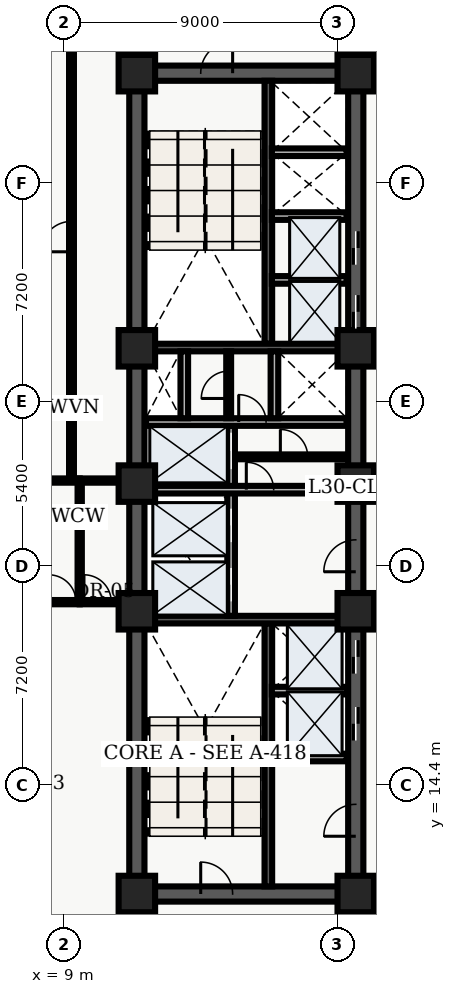
"""IFC4 building model, lengths in metres.
Left out: names, types, materials, properties, quantities, classifications, styles, units other than length and angle.
Written with IfcOpenShell. Run it as: python <this file> out.ifc"""

import sys

from ifc_helpers import new_model, entity, si_unit, converted_unit, direction, frame, origin_with_axes, origin_2d_with_axis, place, context, subcontext, project, spatial, polyline, rectangle, outline, extrude, element, fill, save


model = new_model("IFC4")
c1 = context("Model", 3, precision=1e-05, world=origin_with_axes(), true_north=direction((0.0, 1.0)))
c2 = subcontext(c1, "Body", "Model", "MODEL_VIEW")
j1 = project(units=[si_unit("LENGTHUNIT", "METRE"), converted_unit("PLANEANGLEUNIT", "DEGREE", entity("IfcPlaneAngleMeasure", 0.017), si_unit("PLANEANGLEUNIT", "RADIAN"), dimensions=[0, 0, 0, 0, 0, 0, 0])], contexts=[c1])
p1 = place(None, origin_with_axes())
s1 = spatial("IfcSite", under=j1, at=p1, CompositionType="ELEMENT")
p2 = place(p1, origin_with_axes())
s2 = spatial("IfcBuilding", under=s1, at=p2, CompositionType="ELEMENT")
p3 = place(p2, frame((0.0, 0.0, 124.2), z_axis=(0.0, 0.0, 1.0), x_axis=(1.0, 0.0, 0.0)))
s3 = spatial("IfcBuildingStorey", under=s2, at=p3, CompositionType="ELEMENT", Elevation=124.2)
p4 = place(p3, frame((11.4, 10.8, 0.0), z_axis=(0.0, 0.0, 1.0), x_axis=(0.0, 1.0, 0.0)))
e1 = element("IfcWall", 1, at=p4, inside=s3, PredefinedType="SHEAR", context=c2, shape_type="SweptSolid", body=[
    extrude(outline(polyline([(0.0, -0.25), (27.0, -0.25), (27.0, 0.25), (0.0, 0.25), (0.0, -0.25)])), origin_with_axes(), (0.0, 0.0, 1.0), 4.56),
])
p5 = place(p3, frame((11.4, 10.8, 0.0), z_axis=(0.0, 0.0, 1.0), x_axis=(1.0, 0.0, 0.0)))
e2 = element("IfcWall", 2, at=p5, inside=s3, PredefinedType="SHEAR", context=c2, shape_type="SweptSolid", body=[
    extrude(outline(polyline([(0.0, -0.25), (7.2, -0.25), (7.2, 0.25), (0.0, 0.25), (0.0, -0.25)])), origin_with_axes(), (0.0, 0.0, 1.0), 4.56),
])
p6 = place(p5, frame((2.625, 0.0, 0.0), z_axis=(0.0, 0.0, 1.0), x_axis=(1.0, 0.0, 0.0)))
e3 = element("IfcOpeningElement", 3, at=p6, cuts=e2, PredefinedType="OPENING", context=c2, shape_type="SweptSolid", body=[
    extrude(rectangle(XDim=1.05, YDim=0.52, at=origin_2d_with_axis()), origin_with_axes(), (0.0, 0.0, 1.0), 2.15),
])
p7 = place(p3, frame((11.4, 37.8, 0.0), z_axis=(0.0, 0.0, 1.0), x_axis=(1.0, 0.0, 0.0)))
e4 = element("IfcWall", 4, at=p7, inside=s3, PredefinedType="SHEAR", context=c2, shape_type="SweptSolid", body=[
    extrude(outline(polyline([(0.0, -0.25), (7.2, -0.25), (7.2, 0.25), (0.0, 0.25), (0.0, -0.25)])), origin_with_axes(), (0.0, 0.0, 1.0), 4.56),
])
p8 = place(p7, frame((2.625, 0.0, 0.0), z_axis=(0.0, 0.0, 1.0), x_axis=(1.0, 0.0, 0.0)))
e5 = element("IfcOpeningElement", 5, at=p8, cuts=e4, PredefinedType="OPENING", context=c2, shape_type="SweptSolid", body=[
    extrude(rectangle(XDim=1.05, YDim=0.52, at=origin_2d_with_axis()), origin_with_axes(), (0.0, 0.0, 1.0), 2.15),
])
p9 = place(p3, frame((18.6, 10.8, 0.0), z_axis=(0.0, 0.0, 1.0), x_axis=(0.0, 1.0, 0.0)))
e6 = element("IfcWall", 6, at=p9, inside=s3, PredefinedType="SHEAR", context=c2, shape_type="SweptSolid", body=[
    extrude(outline(polyline([(0.0, -0.25), (13.5, -0.25), (13.5, 0.25), (0.0, 0.25), (0.0, -0.25)])), origin_with_axes(), (0.0, 0.0, 1.0), 4.56),
])
p10 = place(p9, frame((5.6, 0.0, 0.0), z_axis=(0.0, 0.0, 1.0), x_axis=(1.0, 0.0, 0.0)))
e7 = element("IfcOpeningElement", 7, at=p10, cuts=e6, PredefinedType="OPENING", context=c2, shape_type="SweptSolid", body=[
    extrude(rectangle(XDim=1.1, YDim=0.52, at=origin_2d_with_axis()), origin_with_axes(), (0.0, 0.0, 1.0), 2.15),
])
p11 = place(p9, frame((7.8, 0.0, 0.0), z_axis=(0.0, 0.0, 1.0), x_axis=(1.0, 0.0, 0.0)))
e8 = element("IfcOpeningElement", 8, at=p11, cuts=e6, PredefinedType="OPENING", context=c2, shape_type="SweptSolid", body=[
    extrude(rectangle(XDim=1.1, YDim=0.52, at=origin_2d_with_axis()), origin_with_axes(), (0.0, 0.0, 1.0), 2.15),
])
p12 = place(p9, frame((11.125, 0.0, 0.0), z_axis=(0.0, 0.0, 1.0), x_axis=(1.0, 0.0, 0.0)))
e9 = element("IfcOpeningElement", 9, at=p12, cuts=e6, PredefinedType="OPENING", context=c2, shape_type="SweptSolid", body=[
    extrude(rectangle(XDim=1.05, YDim=0.52, at=origin_2d_with_axis()), origin_with_axes(), (0.0, 0.0, 1.0), 2.15),
])
p13 = place(p9, frame((2.425, 0.0, 0.0), z_axis=(0.0, 0.0, 1.0), x_axis=(1.0, 0.0, 0.0)))
e10 = element("IfcOpeningElement", 10, at=p13, cuts=e6, PredefinedType="OPENING", context=c2, shape_type="SweptSolid", body=[
    extrude(rectangle(XDim=1.05, YDim=0.52, at=origin_2d_with_axis()), origin_with_axes(), (0.0, 0.0, 1.0), 2.15),
])
p14 = place(p3, frame((18.6, 24.3, 0.0), z_axis=(0.0, 0.0, 1.0), x_axis=(0.0, 1.0, 0.0)))
e11 = element("IfcWall", 11, at=p14, inside=s3, PredefinedType="SHEAR", context=c2, shape_type="SweptSolid", body=[
    extrude(outline(polyline([(0.0, -0.25), (13.5, -0.25), (13.5, 0.25), (0.0, 0.25), (0.0, -0.25)])), origin_with_axes(), (0.0, 0.0, 1.0), 4.56),
])
p15 = place(p14, frame((5.65, 0.0, 0.0), z_axis=(0.0, 0.0, 1.0), x_axis=(1.0, 0.0, 0.0)))
e12 = element("IfcOpeningElement", 12, at=p15, cuts=e11, PredefinedType="OPENING", context=c2, shape_type="SweptSolid", body=[
    extrude(rectangle(XDim=1.1, YDim=0.52, at=origin_2d_with_axis()), origin_with_axes(), (0.0, 0.0, 1.0), 2.15),
])
p16 = place(p14, frame((7.75, 0.0, 0.0), z_axis=(0.0, 0.0, 1.0), x_axis=(1.0, 0.0, 0.0)))
e13 = element("IfcOpeningElement", 13, at=p16, cuts=e11, PredefinedType="OPENING", context=c2, shape_type="SweptSolid", body=[
    extrude(rectangle(XDim=1.1, YDim=0.52, at=origin_2d_with_axis()), origin_with_axes(), (0.0, 0.0, 1.0), 2.15),
])
p17 = place(p3, frame((15.725, 11.05, 0.0), z_axis=(0.0, 0.0, 1.0), x_axis=(0.0, 1.0, 0.0)))
e14 = element("IfcWall", 14, at=p17, inside=s3, PredefinedType="SHEAR", context=c2, shape_type="SweptSolid", body=[
    extrude(outline(polyline([(0.0, -0.125), (8.65, -0.125), (8.65, 0.125), (0.0, 0.125), (0.0, -0.125)])), origin_with_axes(), (0.0, 0.0, 1.0), 4.56),
])
p18 = place(p3, frame((11.65, 19.825, 0.0), z_axis=(0.0, 0.0, 1.0), x_axis=(1.0, 0.0, 0.0)))
e15 = element("IfcWall", 15, at=p18, inside=s3, PredefinedType="SHEAR", context=c2, shape_type="SweptSolid", body=[
    extrude(outline(polyline([(0.0, -0.125), (6.7, -0.125), (6.7, 0.125), (0.0, 0.125), (0.0, -0.125)])), origin_with_axes(), (0.0, 0.0, 1.0), 4.56),
])
p19 = place(p3, frame((15.725, 28.9, 0.0), z_axis=(0.0, 0.0, 1.0), x_axis=(0.0, 1.0, 0.0)))
e16 = element("IfcWall", 16, at=p19, inside=s3, PredefinedType="SHEAR", context=c2, shape_type="SweptSolid", body=[
    extrude(outline(polyline([(0.0, -0.125), (8.65, -0.125), (8.65, 0.125), (0.0, 0.125), (0.0, -0.125)])), origin_with_axes(), (0.0, 0.0, 1.0), 4.56),
])
p20 = place(p3, frame((11.65, 28.775, 0.0), z_axis=(0.0, 0.0, 1.0), x_axis=(1.0, 0.0, 0.0)))
e17 = element("IfcWall", 17, at=p20, inside=s3, PredefinedType="SHEAR", context=c2, shape_type="SweptSolid", body=[
    extrude(outline(polyline([(0.0, -0.125), (6.7, -0.125), (6.7, 0.125), (0.0, 0.125), (0.0, -0.125)])), origin_with_axes(), (0.0, 0.0, 1.0), 4.56),
])
p21 = place(p3, frame((14.5, 19.95, 0.0), z_axis=(0.0, 0.0, 1.0), x_axis=(0.0, 1.0, 0.0)))
e18 = element("IfcWall", 18, at=p21, inside=s3, PredefinedType="SOLIDWALL", context=c2, shape_type="SweptSolid", body=[
    extrude(outline(polyline([(0.0, -0.125), (6.25, -0.125), (6.25, 0.125), (0.0, 0.125), (0.0, -0.125)])), origin_with_axes(), (0.0, 0.0, 1.0), 3.6),
])
p22 = place(p21, frame((1.025, 0.0, 0.0), z_axis=(0.0, 0.0, 1.0), x_axis=(1.0, 0.0, 0.0)))
e19 = element("IfcOpeningElement", 19, at=p22, cuts=e18, PredefinedType="OPENING", context=c2, shape_type="SweptSolid", body=[
    extrude(rectangle(XDim=1.1, YDim=0.27, at=origin_2d_with_axis()), origin_with_axes(), (0.0, 0.0, 1.0), 2.15),
])
p23 = place(p21, frame((2.975, 0.0, 0.0), z_axis=(0.0, 0.0, 1.0), x_axis=(1.0, 0.0, 0.0)))
e20 = element("IfcOpeningElement", 20, at=p23, cuts=e18, PredefinedType="OPENING", context=c2, shape_type="SweptSolid", body=[
    extrude(rectangle(XDim=1.1, YDim=0.27, at=origin_2d_with_axis()), origin_with_axes(), (0.0, 0.0, 1.0), 2.15),
])
p24 = place(p21, frame((5.425, 0.0, 0.0), z_axis=(0.0, 0.0, 1.0), x_axis=(1.0, 0.0, 0.0)))
e21 = element("IfcOpeningElement", 21, at=p24, cuts=e18, PredefinedType="OPENING", context=c2, shape_type="SweptSolid", body=[
    extrude(rectangle(XDim=1.2, YDim=0.27, at=origin_2d_with_axis()), origin_with_axes(), (0.0, 0.0, 1.0), 2.15),
])
p25 = place(p3, frame((11.7, 24.1, 0.0), z_axis=(0.0, 0.0, 1.0), x_axis=(1.0, 0.0, 0.0)))
e22 = element("IfcWall", 22, at=p25, inside=s3, PredefinedType="SOLIDWALL", context=c2, shape_type="SweptSolid", body=[
    extrude(outline(polyline([(0.0, -0.125), (6.6, -0.125), (6.6, 0.125), (0.0, 0.125), (0.0, -0.125)])), origin_with_axes(), (0.0, 0.0, 1.0), 3.6),
])
p26 = place(p25, frame((3.75, 0.0, 0.0), z_axis=(0.0, 0.0, 1.0), x_axis=(1.0, 0.0, 0.0)))
e23 = element("IfcOpeningElement", 23, at=p26, cuts=e22, PredefinedType="OPENING", context=c2, shape_type="SweptSolid", body=[
    extrude(rectangle(XDim=0.9, YDim=0.27, at=origin_2d_with_axis()), origin_with_axes(), (0.0, 0.0, 1.0), 2.15),
])
p27 = place(p3, frame((11.7, 26.325, 0.0), z_axis=(0.0, 0.0, 1.0), x_axis=(1.0, 0.0, 0.0)))
e24 = element("IfcWall", 24, at=p27, inside=s3, PredefinedType="SOLIDWALL", context=c2, shape_type="SweptSolid", body=[
    extrude(outline(polyline([(0.0, -0.125), (6.6, -0.125), (6.6, 0.125), (0.0, 0.125), (0.0, -0.125)])), origin_with_axes(), (0.0, 0.0, 1.0), 3.6),
])
p28 = place(p27, frame((3.5, 0.0, 0.0), z_axis=(0.0, 0.0, 1.0), x_axis=(1.0, 0.0, 0.0)))
e25 = element("IfcOpeningElement", 25, at=p28, cuts=e24, PredefinedType="OPENING", context=c2, shape_type="SweptSolid", body=[
    extrude(rectangle(XDim=0.9, YDim=0.27, at=origin_2d_with_axis()), origin_with_axes(), (0.0, 0.0, 1.0), 2.15),
])
for number, where, z_axis, x_axis in (
    (26, (12.96, 26.45, 0.0), (0.0, 0.0, 1.0), (0.0, 1.0, 0.0)),
    (27, (15.925, 26.45, 0.0), (0.0, 0.0, 1.0), (0.0, 1.0, 0.0)),
):
    element("IfcWall", number, at=place(p3, frame(where, z_axis=z_axis, x_axis=x_axis)), inside=s3, PredefinedType="SOLIDWALL", context=c2, shape_type="SweptSolid", body=[
        extrude(outline(polyline([(0.0, -0.125), (2.2, -0.125), (2.2, 0.125), (0.0, 0.125), (0.0, -0.125)])), origin_with_axes(), (0.0, 0.0, 1.0), 3.6),
    ])
for number, where, z_axis, x_axis in (
    (28, (11.4, 10.8, 0.0), (0.0, 0.0, 1.0), (1.0, 0.0, 0.0)),
    (29, (11.4, 20.1, 0.0), (0.0, 0.0, 1.0), (1.0, 0.0, 0.0)),
    (30, (11.4, 24.3, 0.0), (0.0, 0.0, 1.0), (1.0, 0.0, 0.0)),
    (31, (11.4, 28.75, 0.0), (0.0, 0.0, 1.0), (1.0, 0.0, 0.0)),
    (32, (11.4, 37.8, 0.0), (0.0, 0.0, 1.0), (1.0, 0.0, 0.0)),
    (33, (18.6, 10.8, 0.0), (0.0, 0.0, 1.0), (1.0, 0.0, 0.0)),
    (34, (18.6, 20.1, 0.0), (0.0, 0.0, 1.0), (1.0, 0.0, 0.0)),
    (35, (18.6, 24.3, 0.0), (0.0, 0.0, 1.0), (1.0, 0.0, 0.0)),
    (36, (18.6, 28.75, 0.0), (0.0, 0.0, 1.0), (1.0, 0.0, 0.0)),
    (37, (18.6, 37.8, 0.0), (0.0, 0.0, 1.0), (1.0, 0.0, 0.0)),
):
    element("IfcColumn", number, at=place(p3, frame(where, z_axis=z_axis, x_axis=x_axis)), inside=s3, PredefinedType="COLUMN", context=c2, shape_type="SweptSolid", body=[
        extrude(rectangle(XDim=1.2, YDim=1.2, at=origin_2d_with_axis()), origin_with_axes(), (0.0, 0.0, 1.0), 4.8),
    ])
p29 = place(p3, frame((14.62, 25.18, 0.0), z_axis=(0.0, 0.0, 1.0), x_axis=(1.0, 0.0, 0.0)))
e38 = element("IfcWall", 38, at=p29, inside=s3, PredefinedType="PARTITIONING", context=c2, shape_type="SweptSolid", body=[
    extrude(outline(polyline([(0.0, -0.08), (3.68, -0.08), (3.68, 0.08), (0.0, 0.08), (0.0, -0.08)])), origin_with_axes(), (0.0, 0.0, 1.0), 3.2),
])
p30 = place(p29, frame((1.95, 0.0, 0.0), z_axis=(0.0, 0.0, 1.0), x_axis=(1.0, 0.0, 0.0)))
e39 = element("IfcOpeningElement", 39, at=p30, cuts=e38, PredefinedType="OPENING", context=c2, shape_type="SweptSolid", body=[
    extrude(rectangle(XDim=0.9, YDim=0.18, at=origin_2d_with_axis()), origin_with_axes(), (0.0, 0.0, 1.0), 2.15),
])
p31 = place(p3, frame((14.42, 26.45, 0.0), z_axis=(0.0, 0.0, 1.0), x_axis=(0.0, 1.0, 0.0)))
e40 = element("IfcWall", 40, at=p31, inside=s3, PredefinedType="PARTITIONING", context=c2, shape_type="SweptSolid", body=[
    extrude(outline(polyline([(0.0, -0.08), (2.2, -0.08), (2.2, 0.08), (0.0, 0.08), (0.0, -0.08)])), origin_with_axes(), (0.0, 0.0, 1.0), 3.2),
])
p32 = place(p31, frame((1.1, 0.0, 0.0), z_axis=(0.0, 0.0, 1.0), x_axis=(1.0, 0.0, 0.0)))
e41 = element("IfcOpeningElement", 41, at=p32, cuts=e40, PredefinedType="OPENING", context=c2, shape_type="SweptSolid", body=[
    extrude(rectangle(XDim=0.9, YDim=0.18, at=origin_2d_with_axis()), origin_with_axes(), (0.0, 0.0, 1.0), 2.15),
])
for number, where, z_axis, x_axis in (
    (42, (15.84, 15.29, 0.0), (0.0, 0.0, 1.0), (1.0, 0.0, 0.0)),
    (43, (15.84, 17.49, 0.0), (0.0, 0.0, 1.0), (1.0, 0.0, 0.0)),
    (44, (15.84, 31.0, 0.0), (0.0, 0.0, 1.0), (1.0, 0.0, 0.0)),
    (45, (15.84, 33.1, 0.0), (0.0, 0.0, 1.0), (1.0, 0.0, 0.0)),
    (46, (15.84, 35.2, 0.0), (0.0, 0.0, 1.0), (1.0, 0.0, 0.0)),
):
    element("IfcWall", number, at=place(p3, frame(where, z_axis=z_axis, x_axis=x_axis)), inside=s3, PredefinedType="SOLIDWALL", context=c2, shape_type="SweptSolid", body=[
        extrude(outline(polyline([(0.0, -0.125), (2.46, -0.125), (2.46, 0.125), (0.0, 0.125), (0.0, -0.125)])), origin_with_axes(), (0.0, 0.0, 1.0), 3.2),
    ])
p33 = place(p3, frame((9.52, 20.4, 0.0), z_axis=(0.0, 0.0, 1.0), x_axis=(0.0, 1.0, 0.0)))
e47 = element("IfcWall", 47, at=p33, inside=s3, PredefinedType="PARTITIONING", context=c2, shape_type="SweptSolid", body=[
    extrude(outline(polyline([(0.0, -0.07), (4.0, -0.07), (4.0, 0.07), (0.0, 0.07), (0.0, -0.07)])), origin_with_axes(), (0.0, 0.0, 1.0), 3.2),
])
p34 = place(p3, frame((9.52, 20.4, 0.0), z_axis=(0.0, 0.0, 1.0), x_axis=(1.0, 0.0, 0.0)))
e48 = element("IfcWall", 48, at=p34, inside=s3, PredefinedType="PARTITIONING", context=c2, shape_type="SweptSolid", body=[
    extrude(outline(polyline([(0.0, -0.07), (1.58, -0.07), (1.58, 0.07), (0.0, 0.07), (0.0, -0.07)])), origin_with_axes(), (0.0, 0.0, 1.0), 3.2),
])
p35 = place(p34, frame((0.59, 0.0, 0.0), z_axis=(0.0, 0.0, 1.0), x_axis=(1.0, 0.0, 0.0)))
e49 = element("IfcOpeningElement", 49, at=p35, cuts=e48, PredefinedType="OPENING", context=c2, shape_type="SweptSolid", body=[
    extrude(rectangle(XDim=0.9, YDim=0.16, at=origin_2d_with_axis()), origin_with_axes(), (0.0, 0.0, 1.0), 2.15),
])
p36 = place(p3, frame((9.52, 24.4, 0.0), z_axis=(0.0, 0.0, 1.0), x_axis=(1.0, 0.0, 0.0)))
e50 = element("IfcWall", 50, at=p36, inside=s3, PredefinedType="PARTITIONING", context=c2, shape_type="SweptSolid", body=[
    extrude(outline(polyline([(0.0, -0.07), (1.58, -0.07), (1.58, 0.07), (0.0, 0.07), (0.0, -0.07)])), origin_with_axes(), (0.0, 0.0, 1.0), 3.2),
])
p37 = place(p3, frame((9.25, 24.4, 0.0), z_axis=(0.0, 0.0, 1.0), x_axis=(0.0, 1.0, 0.0)))
e51 = element("IfcWall", 51, at=p37, inside=s3, PredefinedType="PARTITIONING", context=c2, shape_type="SweptSolid", body=[
    extrude(outline(polyline([(0.0, -0.08), (16.1, -0.08), (16.1, 0.08), (0.0, 0.08), (0.0, -0.08)])), origin_with_axes(), (0.0, 0.0, 1.0), 3.2),
])
p38 = place(p37, frame((8.025, 0.0, 0.0), z_axis=(0.0, 0.0, 1.0), x_axis=(1.0, 0.0, 0.0)))
e52 = element("IfcOpeningElement", 52, at=p38, cuts=e51, PredefinedType="OPENING", context=c2, shape_type="SweptSolid", body=[
    extrude(rectangle(XDim=1.0, YDim=0.18, at=origin_2d_with_axis()), origin_with_axes(), (0.0, 0.0, 1.0), 2.15),
])
p39 = place(p3, frame((0.36, 20.4, 0.0), z_axis=(0.0, 0.0, 1.0), x_axis=(1.0, 0.0, 0.0)))
e53 = element("IfcWall", 53, at=p39, inside=s3, PredefinedType="PARTITIONING", context=c2, shape_type="SweptSolid", body=[
    extrude(outline(polyline([(0.0, -0.07), (9.16, -0.07), (9.16, 0.07), (0.0, 0.07), (0.0, -0.07)])), origin_with_axes(), (0.0, 0.0, 1.0), 3.2),
])
p40 = place(p39, frame((8.59, 0.0, 0.0), z_axis=(0.0, 0.0, 1.0), x_axis=(1.0, 0.0, 0.0)))
e54 = element("IfcOpeningElement", 54, at=p40, cuts=e53, PredefinedType="OPENING", context=c2, shape_type="SweptSolid", body=[
    extrude(rectangle(XDim=0.9, YDim=0.16, at=origin_2d_with_axis()), origin_with_axes(), (0.0, 0.0, 1.0), 2.15),
])
p41 = place(p3, frame((0.36, 24.4, 0.0), z_axis=(0.0, 0.0, 1.0), x_axis=(1.0, 0.0, 0.0)))
e55 = element("IfcWall", 55, at=p41, inside=s3, PredefinedType="PARTITIONING", context=c2, shape_type="SweptSolid", body=[
    extrude(outline(polyline([(0.0, -0.07), (9.16, -0.07), (9.16, 0.07), (0.0, 0.07), (0.0, -0.07)])), origin_with_axes(), (0.0, 0.0, 1.0), 3.2),
])
p42 = place(p9, frame((5.6, 0.0, 0.0), z_axis=(0.0, 0.0, 1.0), x_axis=(1.0, 0.0, 0.0)))
e56 = element("IfcDoor", 56, at=p42, inside=s3, OperationType="DOUBLE_DOOR_SLIDING", PredefinedType="DOOR", context=c2, shape_type="SweptSolid", body=[
    extrude(rectangle(XDim=1.1, YDim=0.09, at=origin_2d_with_axis()), origin_with_axes(), (0.0, 0.0, 1.0), 2.15),
])
fill(e7, e56)
p43 = place(p9, frame((7.8, 0.0, 0.0), z_axis=(0.0, 0.0, 1.0), x_axis=(1.0, 0.0, 0.0)))
e57 = element("IfcDoor", 57, at=p43, inside=s3, OperationType="DOUBLE_DOOR_SLIDING", PredefinedType="DOOR", context=c2, shape_type="SweptSolid", body=[
    extrude(rectangle(XDim=1.1, YDim=0.09, at=origin_2d_with_axis()), origin_with_axes(), (0.0, 0.0, 1.0), 2.15),
])
fill(e8, e57)
p44 = place(p14, frame((5.65, 0.0, 0.0), z_axis=(0.0, 0.0, 1.0), x_axis=(1.0, 0.0, 0.0)))
e58 = element("IfcDoor", 58, at=p44, inside=s3, OperationType="SLIDING_TO_LEFT", PredefinedType="DOOR", context=c2, shape_type="SweptSolid", body=[
    extrude(rectangle(XDim=1.1, YDim=0.09, at=origin_2d_with_axis()), origin_with_axes(), (0.0, 0.0, 1.0), 2.15),
])
fill(e12, e58)
p45 = place(p14, frame((7.75, 0.0, 0.0), z_axis=(0.0, 0.0, 1.0), x_axis=(1.0, 0.0, 0.0)))
e59 = element("IfcDoor", 59, at=p45, inside=s3, OperationType="SLIDING_TO_RIGHT", PredefinedType="DOOR", context=c2, shape_type="SweptSolid", body=[
    extrude(rectangle(XDim=1.1, YDim=0.09, at=origin_2d_with_axis()), origin_with_axes(), (0.0, 0.0, 1.0), 2.15),
])
fill(e13, e59)
p46 = place(p21, frame((1.025, 0.0, 0.0), z_axis=(0.0, 0.0, 1.0), x_axis=(1.0, 0.0, 0.0)))
e60 = element("IfcDoor", 60, at=p46, inside=s3, OperationType="SLIDING_TO_LEFT", PredefinedType="DOOR", context=c2, shape_type="SweptSolid", body=[
    extrude(rectangle(XDim=1.1, YDim=0.09, at=origin_2d_with_axis()), origin_with_axes(), (0.0, 0.0, 1.0), 2.15),
])
fill(e19, e60)
p47 = place(p21, frame((2.975, 0.0, 0.0), z_axis=(0.0, 0.0, 1.0), x_axis=(1.0, 0.0, 0.0)))
e61 = element("IfcDoor", 61, at=p47, inside=s3, OperationType="SLIDING_TO_RIGHT", PredefinedType="DOOR", context=c2, shape_type="SweptSolid", body=[
    extrude(rectangle(XDim=1.1, YDim=0.09, at=origin_2d_with_axis()), origin_with_axes(), (0.0, 0.0, 1.0), 2.15),
])
fill(e20, e61)
p48 = place(p21, frame((5.425, 0.0, 0.0), z_axis=(0.0, 0.0, 1.0), x_axis=(1.0, 0.0, 0.0)))
e62 = element("IfcDoor", 62, at=p48, inside=s3, OperationType="DOUBLE_DOOR_SLIDING", PredefinedType="DOOR", context=c2, shape_type="SweptSolid", body=[
    extrude(rectangle(XDim=1.2, YDim=0.09, at=origin_2d_with_axis()), origin_with_axes(), (0.0, 0.0, 1.0), 2.15),
])
fill(e21, e62)
p49 = place(p5, frame((2.625, 0.0, 0.0), z_axis=(0.0, 0.0, 1.0), x_axis=(1.0, 0.0, 0.0)))
e63 = element("IfcDoor", 63, at=p49, inside=s3, OperationType="SINGLE_SWING_LEFT", PredefinedType="DOOR", context=c2, shape_type="SweptSolid", body=[
    extrude(rectangle(XDim=1.05, YDim=0.09, at=origin_2d_with_axis()), origin_with_axes(), (0.0, 0.0, 1.0), 2.15),
])
fill(e3, e63)
p50 = place(p7, frame((2.625, 0.0, 0.0), z_axis=(0.0, 0.0, 1.0), x_axis=(1.0, 0.0, 0.0)))
e64 = element("IfcDoor", 64, at=p50, inside=s3, OperationType="SINGLE_SWING_RIGHT", PredefinedType="DOOR", context=c2, shape_type="SweptSolid", body=[
    extrude(rectangle(XDim=1.05, YDim=0.09, at=origin_2d_with_axis()), origin_with_axes(), (0.0, 0.0, 1.0), 2.15),
])
fill(e5, e64)
p51 = place(p9, frame((11.125, 0.0, 0.0), z_axis=(0.0, 0.0, 1.0), x_axis=(1.0, 0.0, 0.0)))
e65 = element("IfcDoor", 65, at=p51, inside=s3, OperationType="SINGLE_SWING_LEFT", PredefinedType="DOOR", context=c2, shape_type="SweptSolid", body=[
    extrude(rectangle(XDim=1.05, YDim=0.09, at=origin_2d_with_axis()), origin_with_axes(), (0.0, 0.0, 1.0), 2.15),
])
fill(e9, e65)
p52 = place(p27, frame((3.5, 0.0, 0.0), z_axis=(0.0, 0.0, 1.0), x_axis=(1.0, 0.0, 0.0)))
e66 = element("IfcDoor", 66, at=p52, inside=s3, OperationType="SINGLE_SWING_LEFT", PredefinedType="DOOR", context=c2, shape_type="SweptSolid", body=[
    extrude(rectangle(XDim=0.9, YDim=0.09, at=origin_2d_with_axis()), origin_with_axes(), (0.0, 0.0, 1.0), 2.15),
])
fill(e25, e66)
p53 = place(p31, frame((1.1, 0.0, 0.0), z_axis=(0.0, 0.0, 1.0), x_axis=(1.0, 0.0, 0.0)))
e67 = element("IfcDoor", 67, at=p53, inside=s3, OperationType="SINGLE_SWING_LEFT", PredefinedType="DOOR", context=c2, shape_type="SweptSolid", body=[
    extrude(rectangle(XDim=0.9, YDim=0.09, at=origin_2d_with_axis()), origin_with_axes(), (0.0, 0.0, 1.0), 2.15),
])
fill(e41, e67)
p54 = place(p25, frame((3.75, 0.0, 0.0), z_axis=(0.0, 0.0, 1.0), x_axis=(1.0, 0.0, 0.0)))
e68 = element("IfcDoor", 68, at=p54, inside=s3, OperationType="SINGLE_SWING_LEFT", PredefinedType="DOOR", context=c2, shape_type="SweptSolid", body=[
    extrude(rectangle(XDim=0.9, YDim=0.09, at=origin_2d_with_axis()), origin_with_axes(), (0.0, 0.0, 1.0), 2.15),
])
fill(e23, e68)
p55 = place(p29, frame((1.95, 0.0, 0.0), z_axis=(0.0, 0.0, 1.0), x_axis=(1.0, 0.0, 0.0)))
e69 = element("IfcDoor", 69, at=p55, inside=s3, OperationType="SINGLE_SWING_LEFT", PredefinedType="DOOR", context=c2, shape_type="SweptSolid", body=[
    extrude(rectangle(XDim=0.9, YDim=0.09, at=origin_2d_with_axis()), origin_with_axes(), (0.0, 0.0, 1.0), 2.15),
])
fill(e39, e69)
p56 = place(p9, frame((2.425, 0.0, 0.0), z_axis=(0.0, 0.0, 1.0), x_axis=(1.0, 0.0, 0.0)))
e70 = element("IfcDoor", 70, at=p56, inside=s3, OperationType="SINGLE_SWING_LEFT", PredefinedType="DOOR", context=c2, shape_type="SweptSolid", body=[
    extrude(rectangle(XDim=1.05, YDim=0.09, at=origin_2d_with_axis()), origin_with_axes(), (0.0, 0.0, 1.0), 2.15),
])
fill(e10, e70)
p57 = place(p34, frame((0.59, 0.0, 0.0), z_axis=(0.0, 0.0, 1.0), x_axis=(1.0, 0.0, 0.0)))
e71 = element("IfcDoor", 71, at=p57, inside=s3, OperationType="SINGLE_SWING_LEFT", PredefinedType="DOOR", context=c2, shape_type="SweptSolid", body=[
    extrude(rectangle(XDim=0.9, YDim=0.084, at=origin_2d_with_axis()), origin_with_axes(), (0.0, 0.0, 1.0), 2.15),
])
fill(e49, e71)
p58 = place(p39, frame((8.59, 0.0, 0.0), z_axis=(0.0, 0.0, 1.0), x_axis=(1.0, 0.0, 0.0)))
e72 = element("IfcDoor", 72, at=p58, inside=s3, OperationType="SINGLE_SWING_LEFT", PredefinedType="DOOR", context=c2, shape_type="SweptSolid", body=[
    extrude(rectangle(XDim=0.9, YDim=0.084, at=origin_2d_with_axis()), origin_with_axes(), (0.0, 0.0, 1.0), 2.15),
])
fill(e54, e72)
p59 = place(p37, frame((8.025, 0.0, 0.0), z_axis=(0.0, 0.0, 1.0), x_axis=(1.0, 0.0, 0.0)))
e73 = element("IfcDoor", 73, at=p59, inside=s3, OperationType="SINGLE_SWING_LEFT", PredefinedType="DOOR", context=c2, shape_type="SweptSolid", body=[
    extrude(rectangle(XDim=1.0, YDim=0.09, at=origin_2d_with_axis()), origin_with_axes(), (0.0, 0.0, 1.0), 2.15),
])
fill(e52, e73)
save(model, sys.argv[1])
